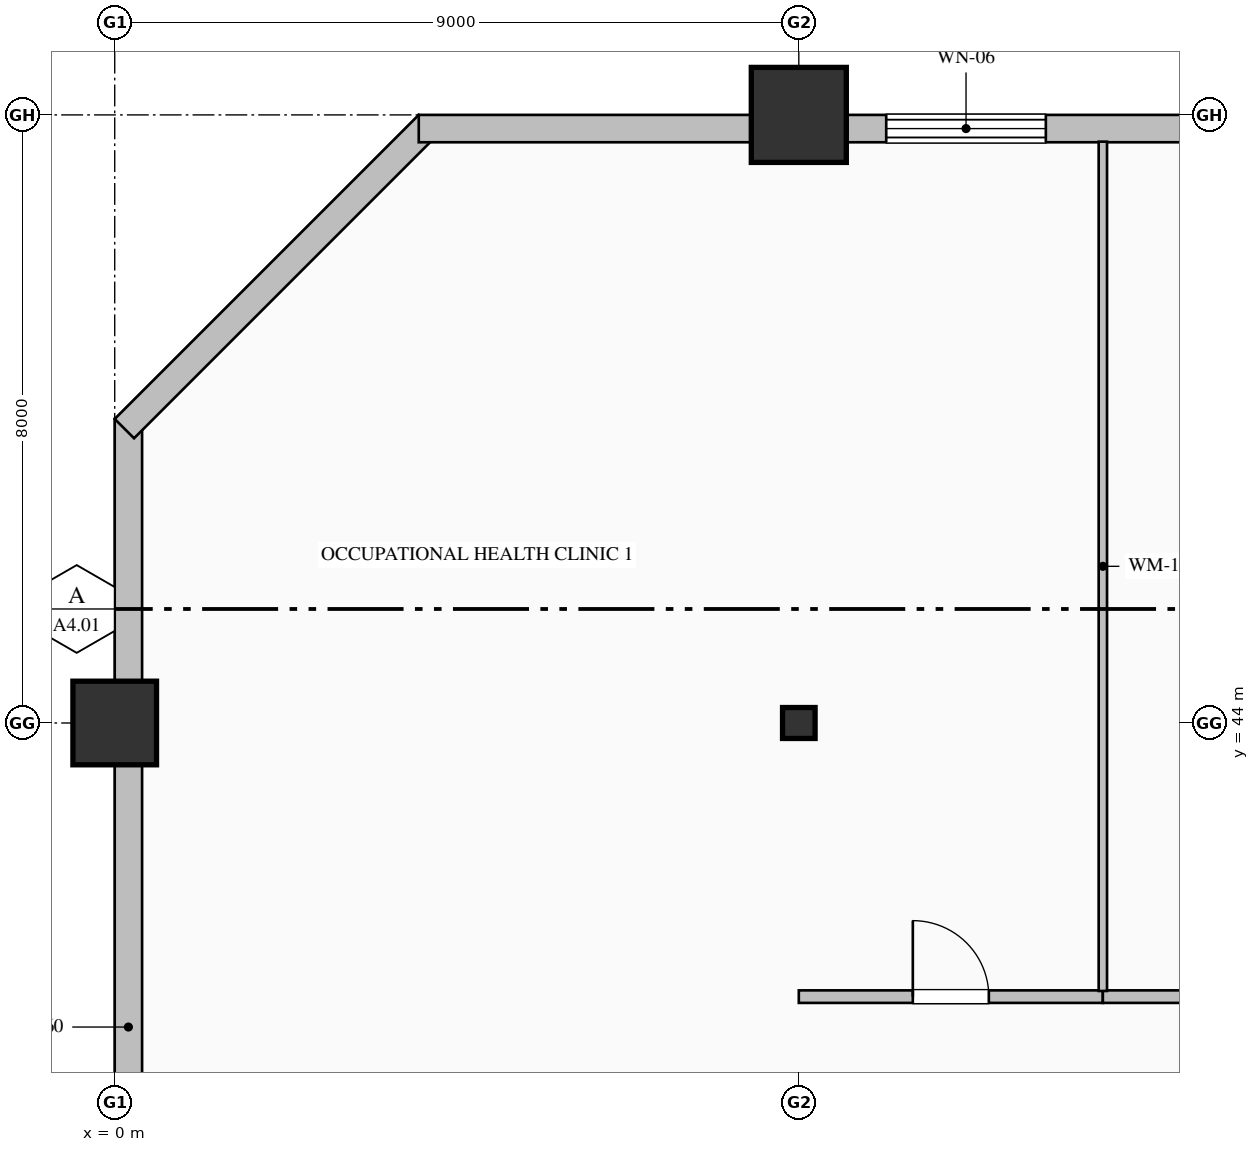
"""IFC4 building model, lengths in metres.
Left out: names, types, materials, properties, quantities, classifications, styles, units other than length and angle.
Written with IfcOpenShell. Run it as: python <this file> out.ifc"""

import sys

from ifc_helpers import new_model, si_unit, direction, frame, frame_2d, origin, origin_2d, place, context, subcontext, project, spatial, rectangle, hollow_rectangle, i_section, extrude, element, fill, save


model = new_model("IFC4")
c1 = context("Model", 3, precision=1e-05, world=origin(), true_north=direction((0.0, 1.0)))
c2 = subcontext(c1, "Body", "Model", "MODEL_VIEW")
j1 = project(units=[si_unit("LENGTHUNIT", "METRE"), si_unit("PLANEANGLEUNIT", "RADIAN")], contexts=[c1])
p1 = place(None, origin())
s1 = spatial("IfcSite", under=j1, at=p1, CompositionType="ELEMENT")
p2 = place(p1, origin())
s2 = spatial("IfcBuilding", under=s1, at=p2, CompositionType="ELEMENT")
p3 = place(p2, frame((0.0, 0.0, 80.2)))
s3 = spatial("IfcBuildingStorey", under=s2, at=p3, CompositionType="ELEMENT", Elevation=80.2)
p4 = place(p3, frame((0.0, 44.0, 0.0), z_axis=(0.0, 0.0, 1.0), x_axis=(1.0, 0.0, 0.0)))
e1 = element("IfcColumn", 1, at=p4, inside=s3, PredefinedType="COLUMN", context=c2, shape_type="SweptSolid", body=[
    extrude(hollow_rectangle(XDim=1.1, YDim=1.1, WallThickness=0.04, at=origin_2d()), origin(), (0.0, 0.0, 1.0), 4.0),
])
p5 = place(p3, frame((9.0, 44.0, 0.0), z_axis=(0.0, 0.0, 1.0), x_axis=(1.0, 0.0, 0.0)))
e2 = element("IfcColumn", 2, at=p5, inside=s3, PredefinedType="COLUMN", context=c2, shape_type="SweptSolid", body=[
    extrude(i_section(OverallWidth=0.407, OverallDepth=0.428, WebThickness=0.02, FlangeThickness=0.035, FilletRadius=0.022, at=origin_2d()), origin(), (0.0, 0.0, 1.0), 4.0),
])
p6 = place(p3, frame((9.0, 52.0, 0.0), z_axis=(0.0, 0.0, 1.0), x_axis=(1.0, 0.0, 0.0)))
e3 = element("IfcColumn", 3, at=p6, inside=s3, PredefinedType="COLUMN", context=c2, shape_type="SweptSolid", body=[
    extrude(hollow_rectangle(XDim=1.25, YDim=1.25, WallThickness=0.045, at=origin_2d()), origin(), (0.0, 0.0, 1.0), 4.0),
])
p7 = place(p3, frame((0.18, 32.0, 0.0), z_axis=(0.0, 0.0, 1.0), x_axis=(0.0, 1.0, 0.0)))
e4 = element("IfcWall", 4, at=p7, inside=s3, PredefinedType="SOLIDWALL", context=c2, shape_type="SweptSolid", body=[
    extrude(rectangle(XDim=16.0, YDim=0.36, at=frame_2d((8.0, 0.0))), origin(), (0.0, 0.0, 1.0), 3.25),
])
p8 = place(p3, frame((0.127, 47.873, 0.0), z_axis=(0.0, 0.0, 1.0), x_axis=(0.707106781187, 0.707106781187, 0.0)))
e5 = element("IfcWall", 5, at=p8, inside=s3, PredefinedType="SOLIDWALL", context=c2, shape_type="SweptSolid", body=[
    extrude(rectangle(XDim=5.657, YDim=0.36, at=frame_2d((2.828, 0.0))), origin(), (0.0, 0.0, 1.0), 3.75),
])
p9 = place(p3, frame((4.0, 51.82, 0.0), z_axis=(0.0, 0.0, 1.0), x_axis=(1.0, 0.0, 0.0)))
e6 = element("IfcWall", 6, at=p9, inside=s3, PredefinedType="SOLIDWALL", context=c2, shape_type="SweptSolid", body=[
    extrude(rectangle(XDim=36.52, YDim=0.36, at=frame_2d((18.26, 0.0))), origin(), (0.0, 0.0, 1.0), 3.25),
])
p10 = place(p9, frame((6.15, 0.0, 0.85)))
e7 = element("IfcOpeningElement", 7, at=p10, cuts=e6, PredefinedType="OPENING", context=c2, shape_type="SweptSolid", body=[
    extrude(rectangle(XDim=2.1, YDim=2.05, at=frame_2d((1.05, 1.025))), frame((0.0, 0.19, 0.0), z_axis=(0.0, -1.0, 0.0), x_axis=(1.0, 0.0, 0.0)), (0.0, 0.0, 1.0), 0.38),
])
p11 = place(p9, frame((13.5, 0.0, 0.85)))
e8 = element("IfcOpeningElement", 8, at=p11, cuts=e6, PredefinedType="OPENING", context=c2, shape_type="SweptSolid", body=[
    extrude(rectangle(XDim=1.8, YDim=2.05, at=frame_2d((0.9, 1.025))), frame((0.0, 0.19, 0.0), z_axis=(0.0, -1.0, 0.0), x_axis=(1.0, 0.0, 0.0)), (0.0, 0.0, 1.0), 0.38),
])
p12 = place(p9, frame((16.95, 0.0, 0.85)))
e9 = element("IfcOpeningElement", 9, at=p12, cuts=e6, PredefinedType="OPENING", context=c2, shape_type="SweptSolid", body=[
    extrude(rectangle(XDim=2.1, YDim=2.05, at=frame_2d((1.05, 1.025))), frame((0.0, 0.19, 0.0), z_axis=(0.0, -1.0, 0.0), x_axis=(1.0, 0.0, 0.0)), (0.0, 0.0, 1.0), 0.38),
])
p13 = place(p9, frame((24.3, 0.0, 0.85)))
e10 = element("IfcOpeningElement", 10, at=p13, cuts=e6, PredefinedType="OPENING", context=c2, shape_type="SweptSolid", body=[
    extrude(rectangle(XDim=1.8, YDim=2.05, at=frame_2d((0.9, 1.025))), frame((0.0, 0.19, 0.0), z_axis=(0.0, -1.0, 0.0), x_axis=(1.0, 0.0, 0.0)), (0.0, 0.0, 1.0), 0.38),
])
p14 = place(p3, frame((9.0, 40.4, 0.0), z_axis=(0.0, 0.0, 1.0), x_axis=(1.0, 0.0, 0.0)))
e11 = element("IfcWall", 11, at=p14, inside=s3, PredefinedType="PARTITIONING", context=c2, shape_type="SweptSolid", body=[
    extrude(rectangle(XDim=4.0, YDim=0.165, at=frame_2d((2.0, 0.0))), origin(), (0.0, 0.0, 1.0), 3.75),
])
p15 = place(p14, frame((1.5, 0.0, 0.0)))
e12 = element("IfcOpeningElement", 12, at=p15, cuts=e11, PredefinedType="OPENING", context=c2, shape_type="SweptSolid", body=[
    extrude(rectangle(XDim=1.0, YDim=2.15, at=frame_2d((0.5, 1.075))), frame((0.0, 0.093, 0.0), z_axis=(0.0, -1.0, 0.0), x_axis=(1.0, 0.0, 0.0)), (0.0, 0.0, 1.0), 0.185),
])
p16 = place(p3, frame((13.0, 40.4, 0.0), z_axis=(0.0, 0.0, 1.0), x_axis=(1.0, 0.0, 0.0)))
e13 = element("IfcWall", 13, at=p16, inside=s3, PredefinedType="PARTITIONING", context=c2, shape_type="SweptSolid", body=[
    extrude(rectangle(XDim=7.5, YDim=0.165, at=frame_2d((3.75, 0.0))), origin(), (0.0, 0.0, 1.0), 3.75),
])
p17 = place(p16, frame((3.25, 0.0, 0.0)))
e14 = element("IfcOpeningElement", 14, at=p17, cuts=e13, PredefinedType="OPENING", context=c2, shape_type="SweptSolid", body=[
    extrude(rectangle(XDim=1.0, YDim=2.15, at=frame_2d((0.5, 1.075))), frame((0.0, 0.093, 0.0), z_axis=(0.0, -1.0, 0.0), x_axis=(1.0, 0.0, 0.0)), (0.0, 0.0, 1.0), 0.185),
])
p18 = place(p3, frame((13.0, 51.648, 0.0), z_axis=(0.0, 0.0, 1.0), x_axis=(0.0, -1.0, 0.0)))
e15 = element("IfcWall", 15, at=p18, inside=s3, PredefinedType="MOVABLE", context=c2, shape_type="SweptSolid", body=[
    extrude(rectangle(XDim=11.173, YDim=0.11, at=frame_2d((5.587, 0.0))), origin(), (0.0, 0.0, 1.0), 3.75),
])
p19 = place(p10, origin())
e16 = element("IfcWindow", 16, at=p19, inside=s3, PartitioningType="TRIPLE_PANEL_VERTICAL", PredefinedType="WINDOW", context=c2, shape_type="SweptSolid", body=[
    extrude(rectangle(XDim=2.1, YDim=2.05, at=frame_2d((1.05, 1.025))), frame((0.0, 0.15, 0.0), z_axis=(0.0, -1.0, 0.0), x_axis=(1.0, 0.0, 0.0)), (0.0, 0.0, 1.0), 0.06),
])
fill(e7, e16)
p20 = place(p15, origin())
e17 = element("IfcDoor", 17, at=p20, inside=s3, OperationType="SINGLE_SWING_LEFT", PredefinedType="DOOR", context=c2, shape_type="SweptSolid", body=[
    extrude(rectangle(XDim=1.0, YDim=2.15, at=frame_2d((0.5, 1.075))), frame((0.0, 0.025, 0.0), z_axis=(0.0, -1.0, 0.0), x_axis=(1.0, 0.0, 0.0)), (0.0, 0.0, 1.0), 0.05),
])
fill(e12, e17)
save(model, sys.argv[1])
